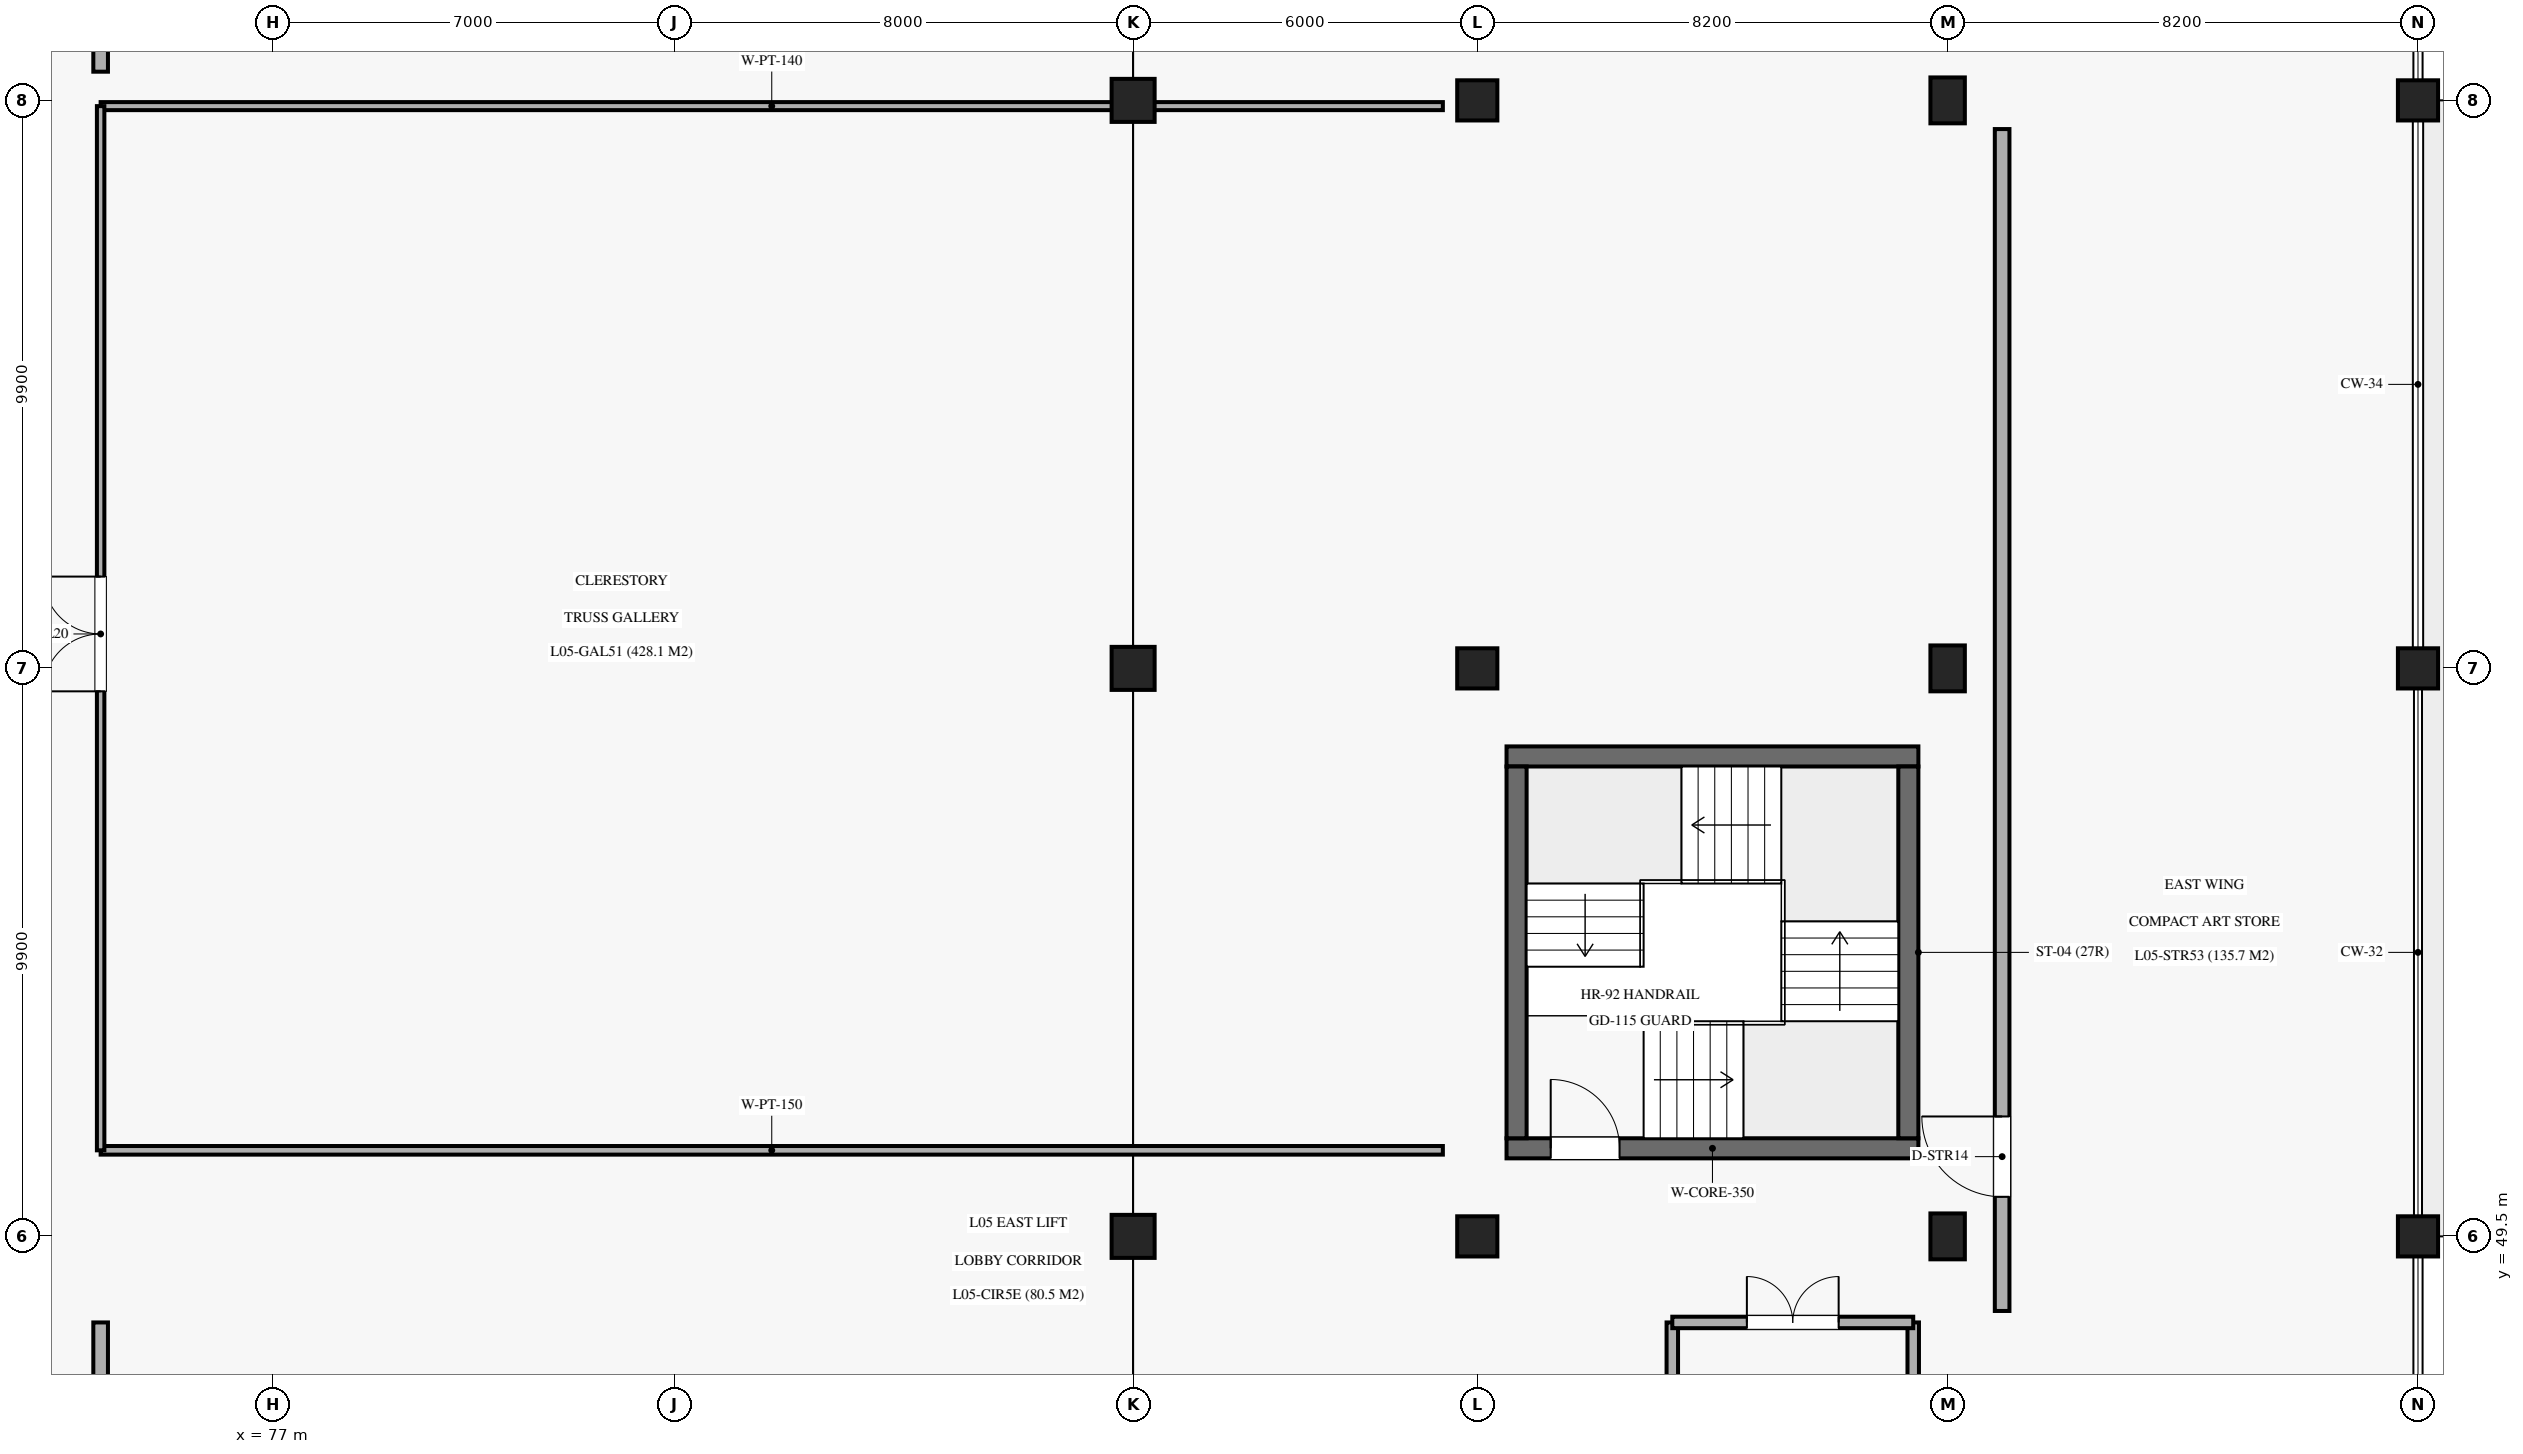
"""IFC4 building model, lengths in metres.
Left out: names, types, materials, properties, quantities, classifications, styles, units other than length and angle.
Written with IfcOpenShell. Run it as: python <this file> out.ifc"""

import sys

from ifc_helpers import new_model, si_unit, direction, frame, frame_2d, origin, origin_2d, place, context, subcontext, project, spatial, rectangle, extrude, element, fill, save


model = new_model("IFC4")
c1 = context("Model", 3, precision=1e-05, world=origin(), true_north=direction((0.0, 1.0)))
c2 = subcontext(c1, "Body", "Model", "MODEL_VIEW")
j1 = project(units=[si_unit("LENGTHUNIT", "METRE"), si_unit("PLANEANGLEUNIT", "RADIAN")], contexts=[c1])
p1 = place(None, origin())
s1 = spatial("IfcSite", under=j1, at=p1, CompositionType="ELEMENT")
p2 = place(p1, origin())
s2 = spatial("IfcBuilding", under=s1, at=p2, CompositionType="ELEMENT")
p3 = place(p2, frame((0.0, 0.0, 28.56)))
s3 = spatial("IfcBuildingStorey", under=s2, at=p3, CompositionType="ELEMENT", Elevation=28.56)
for number, where, z_axis, x_axis in (
    (1, (92.0, 49.5, 0.0), (0.0, 0.0, 1.0), (1.0, 0.0, 0.0)),
    (2, (92.0, 59.4, 0.0), (0.0, 0.0, 1.0), (1.0, 0.0, 0.0)),
    (3, (92.0, 69.3, 0.0), (0.0, 0.0, 1.0), (1.0, 0.0, 0.0)),
):
    element("IfcColumn", number, at=place(p3, frame(where, z_axis=z_axis, x_axis=x_axis)), inside=s3, PredefinedType="COLUMN", context=c2, shape_type="SweptSolid", body=[
        extrude(rectangle(XDim=0.75, YDim=0.75, at=origin_2d()), origin(), (0.0, 0.0, 1.0), 4.59),
    ])
for number, where, z_axis, x_axis in (
    (4, (98.0, 49.5, 0.0), (0.0, 0.0, 1.0), (1.0, 0.0, 0.0)),
    (5, (98.0, 59.4, 0.0), (0.0, 0.0, 1.0), (1.0, 0.0, 0.0)),
    (6, (98.0, 69.3, 0.0), (0.0, 0.0, 1.0), (1.0, 0.0, 0.0)),
):
    element("IfcColumn", number, at=place(p3, frame(where, z_axis=z_axis, x_axis=x_axis)), inside=s3, PredefinedType="COLUMN", context=c2, shape_type="SweptSolid", body=[
        extrude(rectangle(XDim=0.7, YDim=0.7, at=origin_2d()), origin(), (0.0, 0.0, 1.0), 4.59),
    ])
for number, where, z_axis, x_axis in (
    (7, (106.2, 49.5, 0.0), (0.0, 0.0, 1.0), (1.0, 0.0, 0.0)),
    (8, (106.2, 59.4, 0.0), (0.0, 0.0, 1.0), (1.0, 0.0, 0.0)),
    (9, (106.2, 69.3, 0.0), (0.0, 0.0, 1.0), (1.0, 0.0, 0.0)),
):
    element("IfcColumn", number, at=place(p3, frame(where, z_axis=z_axis, x_axis=x_axis)), inside=s3, PredefinedType="COLUMN", context=c2, shape_type="SweptSolid", body=[
        extrude(rectangle(XDim=0.6, YDim=0.8, at=origin_2d()), origin(), (0.0, 0.0, 1.0), 4.59),
    ])
for number, where, z_axis, x_axis in (
    (10, (114.4, 49.5, 0.0), (0.0, 0.0, 1.0), (1.0, 0.0, 0.0)),
    (11, (114.4, 59.4, 0.0), (0.0, 0.0, 1.0), (1.0, 0.0, 0.0)),
    (12, (114.4, 69.3, 0.0), (0.0, 0.0, 1.0), (1.0, 0.0, 0.0)),
):
    element("IfcColumn", number, at=place(p3, frame(where, z_axis=z_axis, x_axis=x_axis)), inside=s3, PredefinedType="COLUMN", context=c2, shape_type="SweptSolid", body=[
        extrude(rectangle(XDim=0.7, YDim=0.7, at=origin_2d()), origin(), (0.0, 0.0, 1.0), 4.59),
    ])
p4 = place(p3, frame((98.51, 51.035, 0.0), z_axis=(0.0, 0.0, 1.0), x_axis=(1.0, 0.0, 0.0)))
e13 = element("IfcWall", 13, at=p4, inside=s3, PredefinedType="SHEAR", context=c2, shape_type="SweptSolid", body=[
    extrude(rectangle(XDim=7.18, YDim=0.35, at=frame_2d((3.59, 0.0))), origin(), (0.0, 0.0, 1.0), 4.35),
])
p5 = place(p4, frame((0.77, 0.0, 0.0)))
e14 = element("IfcOpeningElement", 14, at=p5, cuts=e13, PredefinedType="OPENING", context=c2, shape_type="SweptSolid", body=[
    extrude(rectangle(XDim=1.2, YDim=2.2, at=frame_2d((0.6, 1.1))), frame((0.0, 0.185, 0.0), z_axis=(0.0, -1.0, 0.0), x_axis=(1.0, 0.0, 0.0)), (0.0, 0.0, 1.0), 0.37),
])
p6 = place(p3, frame((98.51, 57.865, 0.0), z_axis=(0.0, 0.0, 1.0), x_axis=(1.0, 0.0, 0.0)))
e15 = element("IfcWall", 15, at=p6, inside=s3, PredefinedType="SHEAR", context=c2, shape_type="SweptSolid", body=[
    extrude(rectangle(XDim=7.18, YDim=0.35, at=frame_2d((3.59, 0.0))), origin(), (0.0, 0.0, 1.0), 4.35),
])
for number, where, z_axis, x_axis in (
    (16, (98.685, 51.21, 0.0), (0.0, 0.0, 1.0), (0.0, 1.0, 0.0)),
    (17, (105.515, 51.21, 0.0), (0.0, 0.0, 1.0), (0.0, 1.0, 0.0)),
):
    element("IfcWall", number, at=place(p3, frame(where, z_axis=z_axis, x_axis=x_axis)), inside=s3, PredefinedType="SHEAR", context=c2, shape_type="SweptSolid", body=[
        extrude(rectangle(XDim=6.48, YDim=0.35, at=frame_2d((3.24, 0.0))), origin(), (0.0, 0.0, 1.0), 4.35),
    ])
p7 = place(p3, frame((101.4, 45.6, 0.0), z_axis=(0.0, 0.0, 1.0), x_axis=(0.0, 1.0, 0.0)))
e18 = element("IfcWall", 18, at=p7, inside=s3, PredefinedType="SOLIDWALL", context=c2, shape_type="SweptSolid", body=[
    extrude(rectangle(XDim=2.4, YDim=0.2, at=frame_2d((1.2, 0.0))), origin(), (0.0, 0.0, 1.0), 3.47),
])
p8 = place(p3, frame((105.6, 40.3, 0.0), z_axis=(0.0, 0.0, 1.0), x_axis=(0.0, 1.0, 0.0)))
e19 = element("IfcWall", 19, at=p8, inside=s3, PredefinedType="SOLIDWALL", context=c2, shape_type="SweptSolid", body=[
    extrude(rectangle(XDim=7.7, YDim=0.2, at=frame_2d((3.85, 0.0))), origin(), (0.0, 0.0, 1.0), 3.47),
])
p9 = place(p3, frame((101.4, 48.0, 0.0), z_axis=(0.0, 0.0, 1.0), x_axis=(1.0, 0.0, 0.0)))
e20 = element("IfcWall", 20, at=p9, inside=s3, PredefinedType="SOLIDWALL", context=c2, shape_type="SweptSolid", body=[
    extrude(rectangle(XDim=4.2, YDim=0.2, at=frame_2d((2.1, 0.0))), origin(), (0.0, 0.0, 1.0), 3.47),
])
p10 = place(p9, frame((1.3, 0.0, 0.0)))
e21 = element("IfcOpeningElement", 21, at=p10, cuts=e20, PredefinedType="OPENING", context=c2, shape_type="SweptSolid", body=[
    extrude(rectangle(XDim=1.6, YDim=2.2, at=frame_2d((0.8, 1.1))), frame((0.0, 0.11, 0.0), z_axis=(0.0, -1.0, 0.0), x_axis=(1.0, 0.0, 0.0)), (0.0, 0.0, 1.0), 0.22),
])
p11 = place(p3, frame((74.0, 51.0, 0.0), z_axis=(0.0, 0.0, 1.0), x_axis=(1.0, 0.0, 0.0)))
e22 = element("IfcWall", 22, at=p11, inside=s3, PredefinedType="PARTITIONING", context=c2, shape_type="SweptSolid", body=[
    extrude(rectangle(XDim=23.4, YDim=0.15, at=frame_2d((11.7, 0.0))), origin(), (0.0, 0.0, 1.0), 3.47),
])
p12 = place(p3, frame((74.0, 69.2, 0.0), z_axis=(0.0, 0.0, 1.0), x_axis=(1.0, 0.0, 0.0)))
e23 = element("IfcWall", 23, at=p12, inside=s3, PredefinedType="PARTITIONING", context=c2, shape_type="SweptSolid", body=[
    extrude(rectangle(XDim=23.4, YDim=0.14, at=frame_2d((11.7, 0.0))), origin(), (0.0, 0.0, 1.0), 3.47),
])
p13 = place(p3, frame((74.0, 51.0, 0.0), z_axis=(0.0, 0.0, 1.0), x_axis=(0.0, 1.0, 0.0)))
e24 = element("IfcWall", 24, at=p13, inside=s3, PredefinedType="PARTITIONING", context=c2, shape_type="SweptSolid", body=[
    extrude(rectangle(XDim=18.2, YDim=0.13, at=frame_2d((9.1, 0.0))), origin(), (0.0, 0.0, 1.0), 3.47),
])
p14 = place(p13, frame((8.0, 0.0, 0.0)))
e25 = element("IfcOpeningElement", 25, at=p14, cuts=e24, PredefinedType="OPENING", context=c2, shape_type="SweptSolid", body=[
    extrude(rectangle(XDim=2.0, YDim=2.5, at=frame_2d((1.0, 1.25))), frame((0.0, 0.075, 0.0), z_axis=(0.0, -1.0, 0.0), x_axis=(1.0, 0.0, 0.0)), (0.0, 0.0, 1.0), 0.15),
])
p15 = place(p3, frame((74.0, 69.8, 0.0), z_axis=(0.0, 0.0, 1.0), x_axis=(0.0, 1.0, 0.0)))
e26 = element("IfcWall", 26, at=p15, inside=s3, PredefinedType="SOLIDWALL", context=c2, shape_type="SweptSolid", body=[
    extrude(rectangle(XDim=18.8, YDim=0.255, at=frame_2d((9.4, 0.0))), origin(), (0.0, 0.0, 1.0), 3.47),
])
p16 = place(p15, frame((8.0, 0.0, 0.0)))
e27 = element("IfcOpeningElement", 27, at=p16, cuts=e26, PredefinedType="OPENING", context=c2, shape_type="SweptSolid", body=[
    extrude(rectangle(XDim=2.0, YDim=2.4, at=frame_2d((1.0, 1.2))), frame((0.0, 0.137, 0.0), z_axis=(0.0, -1.0, 0.0), x_axis=(1.0, 0.0, 0.0)), (0.0, 0.0, 1.0), 0.275),
])
p17 = place(p3, frame((74.0, 28.8, 0.0), z_axis=(0.0, 0.0, 1.0), x_axis=(0.0, 1.0, 0.0)))
e28 = element("IfcWall", 28, at=p17, inside=s3, PredefinedType="SOLIDWALL", context=c2, shape_type="SweptSolid", body=[
    extrude(rectangle(XDim=19.2, YDim=0.255, at=frame_2d((9.6, 0.0))), origin(), (0.0, 0.0, 1.0), 3.47),
])
p18 = place(p17, frame((12.5, 0.0, 0.0)))
e29 = element("IfcOpeningElement", 29, at=p18, cuts=e28, PredefinedType="OPENING", context=c2, shape_type="SweptSolid", body=[
    extrude(rectangle(XDim=1.8, YDim=2.35, at=frame_2d((0.9, 1.175))), frame((0.0, 0.137, 0.0), z_axis=(0.0, -1.0, 0.0), x_axis=(1.0, 0.0, 0.0)), (0.0, 0.0, 1.0), 0.275),
])
p19 = place(p3, frame((107.15, 48.2, 0.0), z_axis=(0.0, 0.0, 1.0), x_axis=(0.0, 1.0, 0.0)))
e30 = element("IfcWall", 30, at=p19, inside=s3, PredefinedType="SOLIDWALL", context=c2, shape_type="SweptSolid", body=[
    extrude(rectangle(XDim=20.6, YDim=0.255, at=frame_2d((10.3, 0.0))), origin(), (0.0, 0.0, 1.0), 3.47),
])
p20 = place(p19, frame((1.99, 0.0, 0.0)))
e31 = element("IfcOpeningElement", 31, at=p20, cuts=e30, PredefinedType="OPENING", context=c2, shape_type="SweptSolid", body=[
    extrude(rectangle(XDim=1.4, YDim=2.25, at=frame_2d((0.7, 1.125))), frame((0.0, 0.137, 0.0), z_axis=(0.0, -1.0, 0.0), x_axis=(1.0, 0.0, 0.0)), (0.0, 0.0, 1.0), 0.275),
])
p21 = place(p5, origin())
e32 = element("IfcDoor", 32, at=p21, inside=s3, OperationType="SINGLE_SWING_LEFT", PredefinedType="DOOR", context=c2, shape_type="SweptSolid", body=[
    extrude(rectangle(XDim=1.2, YDim=2.2, at=frame_2d((0.6, 1.1))), frame((0.0, 0.025, 0.0), z_axis=(0.0, -1.0, 0.0), x_axis=(1.0, 0.0, 0.0)), (0.0, 0.0, 1.0), 0.05),
])
fill(e14, e32)
p22 = place(p10, origin())
e33 = element("IfcDoor", 33, at=p22, inside=s3, OperationType="DOUBLE_DOOR_SINGLE_SWING", PredefinedType="DOOR", context=c2, shape_type="SweptSolid", body=[
    extrude(rectangle(XDim=1.6, YDim=2.2, at=frame_2d((0.8, 1.1))), frame((0.0, 0.025, 0.0), z_axis=(0.0, -1.0, 0.0), x_axis=(1.0, 0.0, 0.0)), (0.0, 0.0, 1.0), 0.05),
])
fill(e21, e33)
p23 = place(p14, origin())
e34 = element("IfcDoor", 34, at=p23, inside=s3, OperationType="DOUBLE_DOOR_SINGLE_SWING", PredefinedType="DOOR", context=c2, shape_type="SweptSolid", body=[
    extrude(rectangle(XDim=2.0, YDim=2.5, at=frame_2d((1.0, 1.25))), frame((0.0, 0.025, 0.0), z_axis=(0.0, -1.0, 0.0), x_axis=(1.0, 0.0, 0.0)), (0.0, 0.0, 1.0), 0.05),
])
fill(e25, e34)
p24 = place(p20, origin())
e35 = element("IfcDoor", 35, at=p24, inside=s3, OperationType="SINGLE_SWING_RIGHT", PredefinedType="DOOR", context=c2, shape_type="SweptSolid", body=[
    extrude(rectangle(XDim=1.4, YDim=2.25, at=frame_2d((0.7, 1.125))), frame((0.0, 0.025, 0.0), z_axis=(0.0, -1.0, 0.0), x_axis=(1.0, 0.0, 0.0)), (0.0, 0.0, 1.0), 0.05),
])
fill(e31, e35)
save(model, sys.argv[1])
